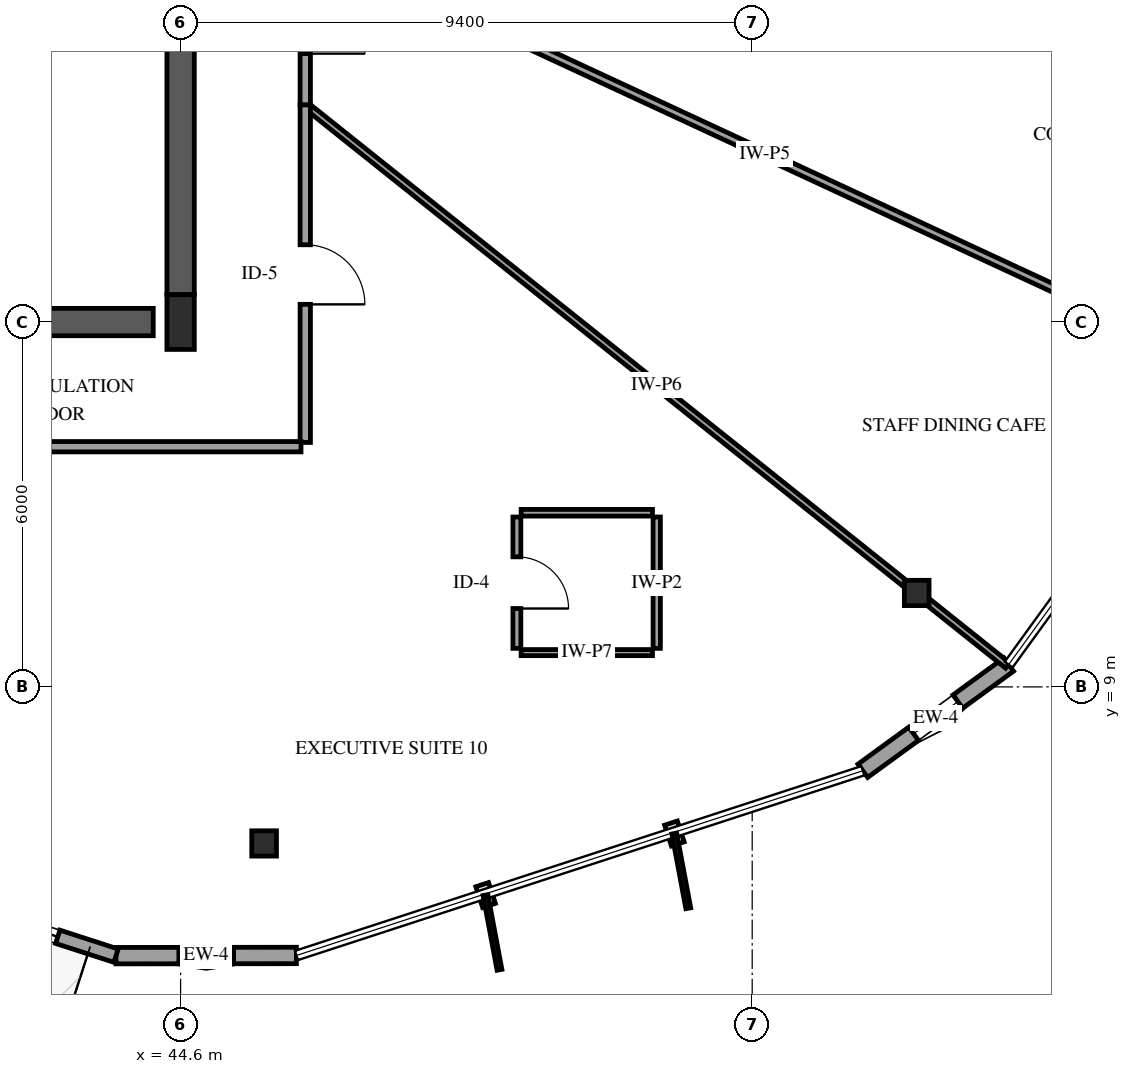
"""IFC4 building model, lengths in metres.
Left out: names, types, materials, properties, quantities, classifications, styles, units other than length and angle.
Written with IfcOpenShell. Run it as: python <this file> out.ifc"""

import sys

from ifc_helpers import new_model, si_unit, direction, frame, frame_2d, origin, origin_2d, place, context, subcontext, project, spatial, rectangle, i_section, extrude, element, fill, save


model = new_model("IFC4")
c1 = context("Model", 3, precision=1e-05, world=origin(), true_north=direction((0.0, 1.0)))
c2 = subcontext(c1, "Body", "Model", "MODEL_VIEW")
j1 = project(units=[si_unit("LENGTHUNIT", "METRE"), si_unit("PLANEANGLEUNIT", "RADIAN")], contexts=[c1])
p1 = place(None, origin())
s1 = spatial("IfcSite", under=j1, at=p1, CompositionType="ELEMENT")
p2 = place(p1, origin())
s2 = spatial("IfcBuilding", under=s1, at=p2, CompositionType="ELEMENT")
p3 = place(p2, frame((0.0, 0.0, 230.2)))
s3 = spatial("IfcBuildingStorey", under=s2, at=p3, CompositionType="ELEMENT", Elevation=230.2)
p4 = place(p3, frame((41.3, 15.0, 0.0), z_axis=(0.0, 0.0, 1.0), x_axis=(1.0, 0.0, 0.0)))
e1 = element("IfcWall", 1, at=p4, inside=s3, PredefinedType="SHEAR", context=c2, shape_type="SweptSolid", body=[
    extrude(rectangle(XDim=2.85, YDim=0.45, at=frame_2d((1.425, 0.0))), origin(), (0.0, 0.0, 1.0), 3.6),
])
p5 = place(p3, frame((44.6, 15.45, 0.0), z_axis=(0.0, 0.0, 1.0), x_axis=(0.0, 1.0, 0.0)))
e2 = element("IfcWall", 2, at=p5, inside=s3, PredefinedType="SHEAR", context=c2, shape_type="SweptSolid", body=[
    extrude(rectangle(XDim=6.35, YDim=0.45, at=frame_2d((3.175, 0.0))), origin(), (0.0, 0.0, 1.0), 3.6),
])
p6 = place(p3, frame((44.6, 15.0, 0.0), z_axis=(0.0, 0.0, 1.0), x_axis=(1.0, 0.0, 0.0)))
e3 = element("IfcColumn", 3, at=p6, inside=s3, PredefinedType="PILASTER", context=c2, shape_type="SweptSolid", body=[
    extrude(rectangle(XDim=0.45, YDim=0.9, at=origin_2d()), origin(), (0.0, 0.0, 1.0), 3.6),
])
for number, where, z_axis, x_axis in (
    (4, (45.973, 6.426, 0.0), (0.0, 0.0, 1.0), (1.0, 0.0, 0.0)),
    (5, (56.705, 10.545, 0.0), (0.0, 0.0, 1.0), (1.0, 0.0, 0.0)),
):
    element("IfcColumn", number, at=place(p3, frame(where, z_axis=z_axis, x_axis=x_axis)), inside=s3, PredefinedType="COLUMN", context=c2, shape_type="SweptSolid", body=[
        extrude(i_section(OverallWidth=0.406, OverallDepth=0.416, WebThickness=0.03, FlangeThickness=0.048, FilletRadius=0.038, at=origin_2d()), origin(), (0.0, 0.0, 1.0), 3.6),
    ])
p7 = place(p3, frame((43.538, 4.58, 0.0), z_axis=(0.0, 0.0, 1.0), x_axis=(0.999999427689, 0.00106987018, 0.0)))
e6 = element("IfcWall", 6, at=p7, inside=s3, PredefinedType="SOLIDWALL", context=c2, shape_type="SweptSolid", body=[
    extrude(rectangle(XDim=2.967, YDim=0.27, at=frame_2d((1.483, 0.0))), origin(), (0.0, 0.0, 1.0), 2.679),
])
p8 = place(p7, frame((1.033, 0.0, 0.75)))
e7 = element("IfcOpeningElement", 7, at=p8, cuts=e6, PredefinedType="OPENING", context=c2, shape_type="SweptSolid", body=[
    extrude(rectangle(XDim=0.9, YDim=1.5, at=frame_2d((0.45, 0.75))), frame((0.0, 0.145, 0.0), z_axis=(0.0, -1.0, 0.0), x_axis=(1.0, 0.0, 0.0)), (0.0, 0.0, 1.0), 0.29),
])
p9 = place(p3, frame((34.217, 7.598, 0.0), z_axis=(0.0, 0.0, 1.0), x_axis=(0.951374090692, -0.308037886567, 0.0)))
e8 = element("IfcWall", 8, at=p9, inside=s3, PredefinedType="SOLIDWALL", context=c2, shape_type="SweptSolid", body=[
    extrude(rectangle(XDim=9.798, YDim=0.23, at=frame_2d((4.899, 0.0))), origin(), (0.0, 0.0, 1.0), 2.679),
])
p10 = place(p9, frame((4.399, 0.0, 0.0)))
e9 = element("IfcOpeningElement", 9, at=p10, cuts=e8, PredefinedType="OPENING", context=c2, shape_type="SweptSolid", body=[
    extrude(rectangle(XDim=1.0, YDim=2.15, at=frame_2d((0.5, 1.075))), frame((0.0, 0.125, 0.0), z_axis=(0.0, -1.0, 0.0), x_axis=(1.0, 0.0, 0.0)), (0.0, 0.0, 1.0), 0.25),
])
p11 = place(p9, frame((0.629, 0.0, 0.72)))
e10 = element("IfcOpeningElement", 10, at=p11, cuts=e8, PredefinedType="OPENING", context=c2, shape_type="SweptSolid", body=[
    extrude(rectangle(XDim=1.05, YDim=1.55, at=frame_2d((0.525, 0.775))), frame((0.0, 0.125, 0.0), z_axis=(0.0, -1.0, 0.0), x_axis=(1.0, 0.0, 0.0)), (0.0, 0.0, 1.0), 0.25),
])
p12 = place(p9, frame((7.74, 0.0, 0.72)))
e11 = element("IfcOpeningElement", 11, at=p12, cuts=e8, PredefinedType="OPENING", context=c2, shape_type="SweptSolid", body=[
    extrude(rectangle(XDim=1.05, YDim=1.55, at=frame_2d((0.525, 0.775))), frame((0.0, 0.125, 0.0), z_axis=(0.0, -1.0, 0.0), x_axis=(1.0, 0.0, 0.0)), (0.0, 0.0, 1.0), 0.25),
])
p13 = place(p3, frame((55.82, 7.621, 0.0), z_axis=(0.0, 0.0, 1.0), x_axis=(0.808383627719, 0.58865602047, 0.0)))
e12 = element("IfcWall", 12, at=p13, inside=s3, PredefinedType="SOLIDWALL", context=c2, shape_type="SweptSolid", body=[
    extrude(rectangle(XDim=2.967, YDim=0.27, at=frame_2d((1.483, 0.0))), origin(), (0.0, 0.0, 1.0), 2.679),
])
p14 = place(p13, frame((1.033, 0.0, 0.75)))
e13 = element("IfcOpeningElement", 13, at=p14, cuts=e12, PredefinedType="OPENING", context=c2, shape_type="SweptSolid", body=[
    extrude(rectangle(XDim=0.9, YDim=1.5, at=frame_2d((0.45, 0.75))), frame((0.0, 0.145, 0.0), z_axis=(0.0, -1.0, 0.0), x_axis=(1.0, 0.0, 0.0)), (0.0, 0.0, 1.0), 0.29),
])
p15 = place(p3, frame((46.65, 21.265, 0.0), z_axis=(0.0, 0.0, 1.0), x_axis=(0.907110307169, -0.420892968137, 0.0)))
e14 = element("IfcWall", 14, at=p15, inside=s3, PredefinedType="PARTITIONING", context=c2, shape_type="SweptSolid", body=[
    extrude(rectangle(XDim=16.657, YDim=0.13, at=frame_2d((8.329, 0.0))), origin(), (0.0, 0.0, 1.0), 3.3),
])
p16 = place(p3, frame((46.65, 18.573, 0.0), z_axis=(0.0, 0.0, 1.0), x_axis=(0.781517773411, -0.623882977683, 0.0)))
e15 = element("IfcWall", 15, at=p16, inside=s3, PredefinedType="PARTITIONING", context=c2, shape_type="SweptSolid", body=[
    extrude(rectangle(XDim=14.781, YDim=0.11, at=frame_2d((7.391, 0.0))), origin(), (0.0, 0.0, 1.0), 3.3),
])
p17 = place(p3, frame((46.65, 18.573, 0.0), z_axis=(0.0, 0.0, 1.0), x_axis=(0.0, -1.0, 0.0)))
e16 = element("IfcWall", 16, at=p17, inside=s3, PredefinedType="PARTITIONING", context=c2, shape_type="SweptSolid", body=[
    extrude(rectangle(XDim=5.553, YDim=0.17, at=frame_2d((2.776, 0.0))), origin(), (0.0, 0.0, 1.0), 3.3),
])
p18 = place(p17, frame((2.302, 0.0, 0.0)))
e17 = element("IfcOpeningElement", 17, at=p18, cuts=e16, PredefinedType="OPENING", context=c2, shape_type="SweptSolid", body=[
    extrude(rectangle(XDim=0.98, YDim=2.15, at=frame_2d((0.49, 1.075))), frame((0.0, 0.095, 0.0), z_axis=(0.0, -1.0, 0.0), x_axis=(1.0, 0.0, 0.0)), (0.0, 0.0, 1.0), 0.19),
])
p19 = place(p3, frame((46.58, 12.95, 0.0), z_axis=(0.0, 0.0, 1.0), x_axis=(-1.0, 0.0, 0.0)))
e18 = element("IfcWall", 18, at=p19, inside=s3, PredefinedType="PARTITIONING", context=c2, shape_type="SweptSolid", body=[
    extrude(rectangle(XDim=5.38, YDim=0.17, at=frame_2d((2.69, 0.0))), origin(), (0.0, 0.0, 1.0), 3.3),
])
p20 = place(p3, frame((46.65, 21.265, 0.0), z_axis=(0.0, 0.0, 1.0), x_axis=(0.0, -1.0, 0.0)))
e19 = element("IfcWall", 19, at=p20, inside=s3, PredefinedType="PARTITIONING", context=c2, shape_type="SweptSolid", body=[
    extrude(rectangle(XDim=2.692, YDim=0.17, at=frame_2d((1.346, 0.0))), origin(), (0.0, 0.0, 1.0), 3.3),
])
p21 = place(p20, frame((0.871, 0.0, 0.0)))
e20 = element("IfcOpeningElement", 20, at=p21, cuts=e19, PredefinedType="OPENING", context=c2, shape_type="SweptSolid", body=[
    extrude(rectangle(XDim=0.98, YDim=2.15, at=frame_2d((0.49, 1.075))), frame((0.0, 0.095, 0.0), z_axis=(0.0, -1.0, 0.0), x_axis=(1.0, 0.0, 0.0)), (0.0, 0.0, 1.0), 0.19),
])
p22 = place(p3, frame((50.13, 11.794, 0.0), z_axis=(0.0, 0.0, 1.0), x_axis=(0.0, -1.0, 0.0)))
e21 = element("IfcWall", 21, at=p22, inside=s3, PredefinedType="PARTITIONING", context=c2, shape_type="SweptSolid", body=[
    extrude(rectangle(XDim=2.16, YDim=0.13, at=frame_2d((1.08, 0.0))), origin(), (0.0, 0.0, 1.0), 3.3),
])
p23 = place(p22, frame((0.655, 0.0, 0.0)))
e22 = element("IfcOpeningElement", 22, at=p23, cuts=e21, PredefinedType="OPENING", context=c2, shape_type="SweptSolid", body=[
    extrude(rectangle(XDim=0.85, YDim=2.1, at=frame_2d((0.425, 1.05))), frame((0.0, 0.075, 0.0), z_axis=(0.0, -1.0, 0.0), x_axis=(1.0, 0.0, 0.0)), (0.0, 0.0, 1.0), 0.15),
])
p24 = place(p3, frame((52.43, 9.634, 0.0), z_axis=(0.0, 0.0, 1.0), x_axis=(0.0, 1.0, 0.0)))
e23 = element("IfcWall", 23, at=p24, inside=s3, PredefinedType="PARTITIONING", context=c2, shape_type="SweptSolid", body=[
    extrude(rectangle(XDim=2.16, YDim=0.12, at=frame_2d((1.08, 0.0))), origin(), (0.0, 0.0, 1.0), 3.3),
])
p25 = place(p3, frame((52.36, 11.864, 0.0), z_axis=(0.0, 0.0, 1.0), x_axis=(-1.0, 0.0, 0.0)))
e24 = element("IfcWall", 24, at=p25, inside=s3, PredefinedType="PARTITIONING", context=c2, shape_type="SweptSolid", body=[
    extrude(rectangle(XDim=2.16, YDim=0.11, at=frame_2d((1.08, 0.0))), origin(), (0.0, 0.0, 1.0), 3.3),
])
p26 = place(p3, frame((50.2, 9.564, 0.0), z_axis=(0.0, 0.0, 1.0), x_axis=(1.0, 0.0, 0.0)))
e25 = element("IfcWall", 25, at=p26, inside=s3, PredefinedType="PARTITIONING", context=c2, shape_type="SweptSolid", body=[
    extrude(rectangle(XDim=2.16, YDim=0.1, at=frame_2d((1.08, 0.0))), origin(), (0.0, 0.0, 1.0), 3.3),
])
p27 = place(p8, origin())
e26 = element("IfcWindow", 26, at=p27, inside=s3, PartitioningType="SINGLE_PANEL", PredefinedType="WINDOW", context=c2, shape_type="SweptSolid", body=[
    extrude(rectangle(XDim=0.9, YDim=1.5, at=frame_2d((0.45, 0.75))), frame((0.0, 0.03, 0.0), z_axis=(0.0, -1.0, 0.0), x_axis=(1.0, 0.0, 0.0)), (0.0, 0.0, 1.0), 0.06),
])
fill(e7, e26)
p28 = place(p12, origin())
e27 = element("IfcWindow", 27, at=p28, inside=s3, PartitioningType="SINGLE_PANEL", PredefinedType="WINDOW", context=c2, shape_type="SweptSolid", body=[
    extrude(rectangle(XDim=1.05, YDim=1.55, at=frame_2d((0.525, 0.775))), frame((0.0, 0.03, 0.0), z_axis=(0.0, -1.0, 0.0), x_axis=(1.0, 0.0, 0.0)), (0.0, 0.0, 1.0), 0.06),
])
fill(e11, e27)
p29 = place(p14, origin())
e28 = element("IfcWindow", 28, at=p29, inside=s3, PartitioningType="SINGLE_PANEL", PredefinedType="WINDOW", context=c2, shape_type="SweptSolid", body=[
    extrude(rectangle(XDim=0.9, YDim=1.5, at=frame_2d((0.45, 0.75))), frame((0.0, 0.03, 0.0), z_axis=(0.0, -1.0, 0.0), x_axis=(1.0, 0.0, 0.0)), (0.0, 0.0, 1.0), 0.06),
])
fill(e13, e28)
p30 = place(p18, origin())
e29 = element("IfcDoor", 29, at=p30, inside=s3, OperationType="SINGLE_SWING_RIGHT", PredefinedType="DOOR", context=c2, shape_type="SweptSolid", body=[
    extrude(rectangle(XDim=0.98, YDim=2.15, at=frame_2d((0.49, 1.075))), frame((0.0, 0.025, 0.0), z_axis=(0.0, -1.0, 0.0), x_axis=(1.0, 0.0, 0.0)), (0.0, 0.0, 1.0), 0.05),
])
fill(e17, e29)
p31 = place(p21, origin())
e30 = element("IfcDoor", 30, at=p31, inside=s3, OperationType="SINGLE_SWING_RIGHT", PredefinedType="DOOR", context=c2, shape_type="SweptSolid", body=[
    extrude(rectangle(XDim=0.98, YDim=2.15, at=frame_2d((0.49, 1.075))), frame((0.0, 0.025, 0.0), z_axis=(0.0, -1.0, 0.0), x_axis=(1.0, 0.0, 0.0)), (0.0, 0.0, 1.0), 0.05),
])
fill(e20, e30)
p32 = place(p23, origin())
e31 = element("IfcDoor", 31, at=p32, inside=s3, OperationType="SINGLE_SWING_RIGHT", PredefinedType="DOOR", context=c2, shape_type="SweptSolid", body=[
    extrude(rectangle(XDim=0.85, YDim=2.1, at=frame_2d((0.425, 1.05))), frame((0.0, 0.025, 0.0), z_axis=(0.0, -1.0, 0.0), x_axis=(1.0, 0.0, 0.0)), (0.0, 0.0, 1.0), 0.05),
])
fill(e22, e31)
save(model, sys.argv[1])
